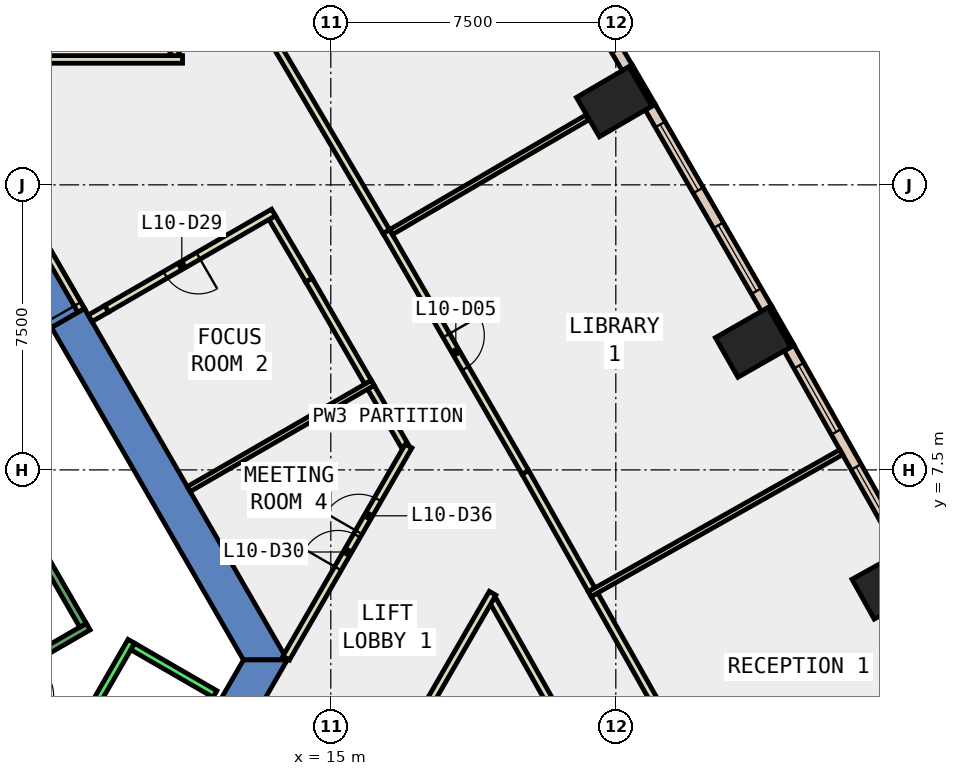
"""IFC4 building model, lengths in metres.
Left out: names, types, materials, properties, quantities, classifications, styles, units other than length and angle.
Written with IfcOpenShell. Run it as: python <this file> out.ifc"""

import sys

from ifc_helpers import new_model, si_unit, direction, frame, frame_2d, origin, origin_2d, place, context, subcontext, project, spatial, polyline, rectangle, outline, extrude, element, fill, save


model = new_model("IFC4")
c1 = context("Model", 3, precision=1e-05, world=origin(), true_north=direction((0.0, 1.0)))
c2 = subcontext(c1, "Body", "Model", "MODEL_VIEW")
j1 = project(units=[si_unit("LENGTHUNIT", "METRE"), si_unit("PLANEANGLEUNIT", "RADIAN")], contexts=[c1])
p1 = place(None, origin())
s1 = spatial("IfcSite", under=j1, at=p1, CompositionType="ELEMENT")
p2 = place(p1, origin())
s2 = spatial("IfcBuilding", under=s1, at=p2, CompositionType="ELEMENT")
p3 = place(p2, frame((0.0, 0.0, 51.8)))
s3 = spatial("IfcBuildingStorey", under=s2, at=p3, CompositionType="ELEMENT", Elevation=51.8)
for number, where, z_axis, x_axis in (
    (1, (29.706, 4.487, -0.4), (0.0, 0.0, 1.0), (-0.487, 0.873, 0.0)),
    (2, (26.112, 10.855, -0.4), (0.0, 0.0, 1.0), (-0.496, 0.869, 0.0)),
    (3, (22.457, 17.186, -0.4), (0.0, 0.0, 1.0), (-0.504, 0.864, 0.0)),
):
    element("IfcColumn", number, at=place(p3, frame(where, z_axis=z_axis, x_axis=x_axis)), inside=s3, PredefinedType="COLUMN", context=c2, shape_type="SweptSolid", body=[
        extrude(rectangle(XDim=1.2, YDim=1.6, at=origin_2d()), origin(), (0.0, 0.0, 1.0), 4.2),
    ])
p4 = place(p3, frame((0.0, 0.0, -0.4)))
e4 = element("IfcWall", 4, at=p4, inside=s3, PredefinedType="SHEAR", context=c2, shape_type="SweptSolid", body=[
    extrude(outline(polyline([(8.517, 11.748), (7.651, 11.248), (12.702, 2.5), (13.856, 2.5), (8.517, 11.748)])), origin(), (0.0, 0.0, 1.0), 4.2),
])
p5 = place(p3, frame((0.0, 0.0, 3.6)))
e5 = element("IfcWall", 5, at=p5, inside=s3, PredefinedType="SHEAR", context=c2, shape_type="SweptSolid", body=[
    extrude(outline(polyline([(7.517, 13.48), (6.651, 12.98), (7.651, 11.248), (8.517, 11.748), (7.517, 13.48)])), origin(), (0.0, 0.0, 1.0), 0.2),
])
p6 = place(p3, frame((0.0, 0.0, -0.4)))
e6 = element("IfcWall", 6, at=p6, inside=s3, PredefinedType="SHEAR", context=c2, shape_type="SweptSolid", body=[
    extrude(outline(polyline([(11.801, 0.94), (12.667, 0.44), (13.856, 2.5), (12.702, 2.5), (11.801, 0.94)])), origin(), (0.0, 0.0, 1.0), 4.2),
])
p7 = place(p3, frame((27.148, 10.755, 0.0), z_axis=(0.0, 0.0, 1.0), x_axis=(-0.495766453659, 0.86845588456, 0.0)))
e7 = element("IfcWall", 7, at=p7, inside=s3, PredefinedType="STANDARD", context=c2, shape_type="SweptSolid", body=[
    extrude(rectangle(XDim=1.2, YDim=0.1, at=frame_2d((0.6, 0.0))), origin(), (0.0, 0.0, 1.0), 3.8),
])
p8 = place(p3, frame((23.493, 17.097, 0.0), z_axis=(0.0, 0.0, 1.0), x_axis=(-0.504225229382, 0.863572184623, 0.0)))
e8 = element("IfcWall", 8, at=p8, inside=s3, PredefinedType="STANDARD", context=c2, shape_type="SweptSolid", body=[
    extrude(rectangle(XDim=1.2, YDim=0.1, at=frame_2d((0.6, 0.0))), origin(), (0.0, 0.0, 1.0), 3.8),
])
p9 = place(p3, frame((30.067, 5.374, 0.0), z_axis=(0.0, 0.0, 1.0), x_axis=(-0.49151046248, 0.870871669807, 0.0)))
e9 = element("IfcWall", 9, at=p9, inside=s3, PredefinedType="STANDARD", context=c2, shape_type="SweptSolid", body=[
    extrude(rectangle(XDim=6.122, YDim=0.3, at=frame_2d((3.061, 0.0))), origin(), (0.0, 0.0, 1.0), 3.8),
])
p10 = place(p9, frame((0.53, 0.0, 0.9)))
e10 = element("IfcOpeningElement", 10, at=p10, cuts=e9, PredefinedType="OPENING", context=c2, shape_type="SweptSolid", body=[
    extrude(rectangle(XDim=2.0, YDim=2.6, at=frame_2d((1.0, 1.3))), frame((0.0, 0.16, 0.0), z_axis=(0.0, -1.0, 0.0), x_axis=(1.0, 0.0, 0.0)), (0.0, 0.0, 1.0), 0.32),
])
p11 = place(p9, frame((3.591, 0.0, 0.9)))
e11 = element("IfcOpeningElement", 11, at=p11, cuts=e9, PredefinedType="OPENING", context=c2, shape_type="SweptSolid", body=[
    extrude(rectangle(XDim=2.0, YDim=2.6, at=frame_2d((1.0, 1.3))), frame((0.0, 0.16, 0.0), z_axis=(0.0, -1.0, 0.0), x_axis=(1.0, 0.0, 0.0)), (0.0, 0.0, 1.0), 0.32),
])
p12 = place(p3, frame((26.464, 11.745, 0.0), z_axis=(0.0, 0.0, 1.0), x_axis=(-0.499957248001, 0.866050085256, 0.0)))
e12 = element("IfcWall", 12, at=p12, inside=s3, PredefinedType="STANDARD", context=c2, shape_type="SweptSolid", body=[
    extrude(rectangle(XDim=6.121, YDim=0.3, at=frame_2d((3.06, 0.0))), origin(), (0.0, 0.0, 1.0), 3.8),
])
p13 = place(p12, frame((0.53, 0.0, 0.9)))
e13 = element("IfcOpeningElement", 13, at=p13, cuts=e12, PredefinedType="OPENING", context=c2, shape_type="SweptSolid", body=[
    extrude(rectangle(XDim=2.0, YDim=2.6, at=frame_2d((1.0, 1.3))), frame((0.0, 0.16, 0.0), z_axis=(0.0, -1.0, 0.0), x_axis=(1.0, 0.0, 0.0)), (0.0, 0.0, 1.0), 0.32),
])
p14 = place(p12, frame((3.591, 0.0, 0.9)))
e14 = element("IfcOpeningElement", 14, at=p14, cuts=e12, PredefinedType="OPENING", context=c2, shape_type="SweptSolid", body=[
    extrude(rectangle(XDim=2.0, YDim=2.6, at=frame_2d((1.0, 1.3))), frame((0.0, 0.16, 0.0), z_axis=(0.0, -1.0, 0.0), x_axis=(1.0, 0.0, 0.0)), (0.0, 0.0, 1.0), 0.32),
])
p15 = place(p3, frame((22.8, 18.08, 0.0), z_axis=(0.0, 0.0, 1.0), x_axis=(-0.508412153373, 0.861113861404, 0.0)))
e15 = element("IfcWall", 15, at=p15, inside=s3, PredefinedType="STANDARD", context=c2, shape_type="SweptSolid", body=[
    extrude(rectangle(XDim=6.121, YDim=0.3, at=frame_2d((3.061, 0.0))), origin(), (0.0, 0.0, 1.0), 3.8),
])
p16 = place(p15, frame((0.53, 0.0, 0.9)))
e16 = element("IfcOpeningElement", 16, at=p16, cuts=e15, PredefinedType="OPENING", context=c2, shape_type="SweptSolid", body=[
    extrude(rectangle(XDim=2.0, YDim=2.6, at=frame_2d((1.0, 1.3))), frame((0.0, 0.16, 0.0), z_axis=(0.0, -1.0, 0.0), x_axis=(1.0, 0.0, 0.0)), (0.0, 0.0, 1.0), 0.32),
])
p17 = place(p15, frame((3.591, 0.0, 0.9)))
e17 = element("IfcOpeningElement", 17, at=p17, cuts=e15, PredefinedType="OPENING", context=c2, shape_type="SweptSolid", body=[
    extrude(rectangle(XDim=2.0, YDim=2.6, at=frame_2d((1.0, 1.3))), frame((0.0, 0.16, 0.0), z_axis=(0.0, -1.0, 0.0), x_axis=(1.0, 0.0, 0.0)), (0.0, 0.0, 1.0), 0.32),
])
p18 = place(p3, frame((15.98, 9.805, 0.0), z_axis=(0.0, 0.0, 1.0), x_axis=(-0.500150684419, 0.865938388614, 0.0)))
e18 = element("IfcWall", 18, at=p18, inside=s3, PredefinedType="PARTITIONING", context=c2, shape_type="SweptSolid", body=[
    extrude(rectangle(XDim=3.109, YDim=0.2, at=frame_2d((1.554, 0.0))), origin(), (0.0, 0.0, 1.0), 3.8),
])
p19 = place(p3, frame((14.425, 12.497, 0.0), z_axis=(0.0, 0.0, 1.0), x_axis=(-0.508111788435, 0.861291129905, 0.0)))
e19 = element("IfcWall", 19, at=p19, inside=s3, PredefinedType="PARTITIONING", context=c2, shape_type="SweptSolid", body=[
    extrude(rectangle(XDim=1.905, YDim=0.2, at=frame_2d((0.953, 0.0))), origin(), (0.0, 0.0, 1.0), 3.8),
])
p20 = place(p3, frame((13.492, 14.274, 0.0), z_axis=(0.0, 0.0, 1.0), x_axis=(-0.866003598361, -0.5000377662, 0.0)))
e20 = element("IfcWall", 20, at=p20, inside=s3, PredefinedType="PARTITIONING", context=c2, shape_type="SweptSolid", body=[
    extrude(rectangle(XDim=5.071, YDim=0.2, at=frame_2d((2.536, 0.0))), origin(), (0.0, 0.0, 1.0), 3.8),
])
p21 = place(p20, frame((2.286, 0.0, 0.0)))
e21 = element("IfcOpeningElement", 21, at=p21, cuts=e20, PredefinedType="OPENING", context=c2, shape_type="SweptSolid", body=[
    extrude(rectangle(XDim=1.0, YDim=2.1, at=frame_2d((0.5, 1.05))), frame((0.0, 0.11, 0.0), z_axis=(0.0, -1.0, 0.0), x_axis=(1.0, 0.0, 0.0)), (0.0, 0.0, 1.0), 0.22),
])
p22 = place(p3, frame((16.948, 8.128, 0.0), z_axis=(0.0, 0.0, 1.0), x_axis=(-0.499931460552, 0.866064971437, 0.0)))
e22 = element("IfcWall", 22, at=p22, inside=s3, PredefinedType="PARTITIONING", context=c2, shape_type="SweptSolid", body=[
    extrude(rectangle(XDim=1.786, YDim=0.2, at=frame_2d((0.893, 0.0))), origin(), (0.0, 0.0, 1.0), 3.8),
])
p23 = place(p3, frame((10.948, 18.386, 0.0), z_axis=(0.0, 0.0, 1.0), x_axis=(-0.506880801681, 0.862016155815, 0.0)))
e23 = element("IfcWall", 23, at=p23, inside=s3, PredefinedType="PARTITIONING", context=c2, shape_type="SweptSolid", body=[
    extrude(rectangle(XDim=0.383, YDim=0.2, at=frame_2d((0.191, 0.0))), origin(), (0.0, 0.0, 1.0), 3.8),
])
p24 = place(p3, frame((21.585, -0.045, 0.0), z_axis=(0.0, 0.0, 1.0), x_axis=(-0.491542684896, 0.870853483042, 0.0)))
e24 = element("IfcWall", 24, at=p24, inside=s3, PredefinedType="PARTITIONING", context=c2, shape_type="SweptSolid", body=[
    extrude(rectangle(XDim=4.738, YDim=0.2, at=frame_2d((2.369, 0.0))), origin(), (0.0, 0.0, 1.0), 3.8),
])
p25 = place(p3, frame((21.937, 4.214, 0.0), z_axis=(0.0, 0.0, 1.0), x_axis=(0.491485799319, -0.870885588965, 0.0)))
e25 = element("IfcWall", 25, at=p25, inside=s3, PredefinedType="PARTITIONING", context=c2, shape_type="SweptSolid", body=[
    extrude(rectangle(XDim=3.548, YDim=0.2, at=frame_2d((1.774, 0.0))), origin(), (0.0, 0.0, 1.0), 3.8),
])
p26 = place(p3, frame((16.46, 13.772, 0.0), z_axis=(0.0, 0.0, 1.0), x_axis=(0.500099745063, -0.865967808286, 0.0)))
e26 = element("IfcWall", 26, at=p26, inside=s3, PredefinedType="PARTITIONING", context=c2, shape_type="SweptSolid", body=[
    extrude(rectangle(XDim=7.319, YDim=0.2, at=frame_2d((3.659, 0.0))), origin(), (0.0, 0.0, 1.0), 3.8),
])
p27 = place(p26, frame((3.159, 0.0, 0.0)))
e27 = element("IfcOpeningElement", 27, at=p27, cuts=e26, PredefinedType="OPENING", context=c2, shape_type="SweptSolid", body=[
    extrude(rectangle(XDim=1.0, YDim=2.1, at=frame_2d((0.5, 1.05))), frame((0.0, 0.11, 0.0), z_axis=(0.0, -1.0, 0.0), x_axis=(1.0, 0.0, 0.0)), (0.0, 0.0, 1.0), 0.22),
])
p28 = place(p3, frame((20.12, 7.434, 0.0), z_axis=(0.0, 0.0, 1.0), x_axis=(0.491394823876, -0.87093692485, 0.0)))
e28 = element("IfcWall", 28, at=p28, inside=s3, PredefinedType="PARTITIONING", context=c2, shape_type="SweptSolid", body=[
    extrude(rectangle(XDim=3.547, YDim=0.2, at=frame_2d((1.773, 0.0))), origin(), (0.0, 0.0, 1.0), 3.8),
])
p29 = place(p3, frame((12.815, 19.946, 0.0), z_axis=(0.0, 0.0, 1.0), x_axis=(0.508287536166, -0.861187424768, 0.0)))
e29 = element("IfcWall", 29, at=p29, inside=s3, PredefinedType="PARTITIONING", context=c2, shape_type="SweptSolid", body=[
    extrude(rectangle(XDim=7.169, YDim=0.2, at=frame_2d((3.584, 0.0))), origin(), (0.0, 0.0, 1.0), 3.8),
])
p30 = place(p3, frame((6.25, 1.894, 0.0), z_axis=(0.0, 0.0, 1.0), x_axis=(0.866043184279, -0.499969202016, 0.0)))
e30 = element("IfcWall", 30, at=p30, inside=s3, PredefinedType="PARTITIONING", context=c2, shape_type="SweptSolid", body=[
    extrude(rectangle(XDim=2.084, YDim=0.2, at=frame_2d((1.042, 0.0))), origin(), (0.0, 0.0, 1.0), 3.8),
])
p31 = place(p30, frame((0.642, 0.0, 0.0)))
e31 = element("IfcOpeningElement", 31, at=p31, cuts=e30, PredefinedType="OPENING", context=c2, shape_type="SweptSolid", body=[
    extrude(rectangle(XDim=0.9, YDim=2.1, at=frame_2d((0.45, 1.05))), frame((0.0, 0.11, 0.0), z_axis=(0.0, -1.0, 0.0), x_axis=(1.0, 0.0, 0.0)), (0.0, 0.0, 1.0), 0.22),
])
p32 = place(p3, frame((16.104, 9.79, 0.0), z_axis=(0.0, 0.0, 1.0), x_axis=(-0.866023462144, -0.500003363005, 0.0)))
e32 = element("IfcWall", 32, at=p32, inside=s3, PredefinedType="PARTITIONING", context=c2, shape_type="SweptSolid", body=[
    extrude(rectangle(XDim=5.592, YDim=0.15, at=frame_2d((2.796, 0.0))), origin(), (0.0, 0.0, 1.0), 3.8),
])
p33 = place(p3, frame((13.827, 2.55, 0.0), z_axis=(0.0, 0.0, 1.0), x_axis=(0.500093193185, 0.865971591988, 0.0)))
e33 = element("IfcWall", 33, at=p33, inside=s3, PredefinedType="PARTITIONING", context=c2, shape_type="SweptSolid", body=[
    extrude(rectangle(XDim=6.441, YDim=0.2, at=frame_2d((3.221, 0.0))), origin(), (0.0, 0.0, 1.0), 3.8),
])
p34 = place(p33, frame((2.721, 0.0, 0.0)))
e34 = element("IfcOpeningElement", 34, at=p34, cuts=e33, PredefinedType="OPENING", context=c2, shape_type="SweptSolid", body=[
    extrude(rectangle(XDim=1.0, YDim=2.1, at=frame_2d((0.5, 1.05))), frame((0.0, 0.11, 0.0), z_axis=(0.0, -1.0, 0.0), x_axis=(1.0, 0.0, 0.0)), (0.0, 0.0, 1.0), 0.22),
])
p35 = place(p33, frame((3.821, 0.0, 0.0)))
e35 = element("IfcOpeningElement", 35, at=p35, cuts=e33, PredefinedType="OPENING", context=c2, shape_type="SweptSolid", body=[
    extrude(rectangle(XDim=1.0, YDim=2.1, at=frame_2d((0.5, 1.05))), frame((0.0, 0.11, 0.0), z_axis=(0.0, -1.0, 0.0), x_axis=(1.0, 0.0, 0.0)), (0.0, 0.0, 1.0), 0.22),
])
p36 = place(p3, frame((0.4, 18.3, 0.0), z_axis=(0.0, 0.0, 1.0), x_axis=(1.0, 0.0, 0.0)))
e36 = element("IfcWall", 36, at=p36, inside=s3, PredefinedType="PARTITIONING", context=c2, shape_type="SweptSolid", body=[
    extrude(rectangle(XDim=10.699, YDim=0.2, at=frame_2d((5.35, 0.0))), origin(), (0.0, 0.0, 1.0), 3.8),
])
p37 = place(p3, frame((19.257, 4.255, 0.0), z_axis=(0.0, 0.0, 1.0), x_axis=(-0.499978317034, -0.866037922089, 0.0)))
e37 = element("IfcWall", 37, at=p37, inside=s3, PredefinedType="PARTITIONING", context=c2, shape_type="SweptSolid", body=[
    extrude(rectangle(XDim=12.913, YDim=0.2, at=frame_2d((6.456, 0.0))), origin(), (0.0, 0.0, 1.0), 3.8),
])
p38 = place(p3, frame((21.813, 4.231, 0.0), z_axis=(0.0, 0.0, 1.0), x_axis=(0.870901264369, 0.491458022337, 0.0)))
e38 = element("IfcWall", 38, at=p38, inside=s3, PredefinedType="PARTITIONING", context=c2, shape_type="SweptSolid", body=[
    extrude(rectangle(XDim=7.6, YDim=0.15, at=frame_2d((3.8, 0.0))), origin(), (0.0, 0.0, 1.0), 3.8),
])
p39 = place(p3, frame((16.584, 13.757, 0.0), z_axis=(0.0, 0.0, 1.0), x_axis=(0.863565634474, 0.504236447469, 0.0)))
e39 = element("IfcWall", 39, at=p39, inside=s3, PredefinedType="PARTITIONING", context=c2, shape_type="SweptSolid", body=[
    extrude(rectangle(XDim=5.981, YDim=0.15, at=frame_2d((2.99, 0.0))), origin(), (0.0, 0.0, 1.0), 3.8),
])
p40 = place(p3, frame((8.43, 11.698, 0.0), z_axis=(0.0, 0.0, 1.0), x_axis=(-0.50002537861, 0.866010750942, 0.0)))
e40 = element("IfcWall", 40, at=p40, inside=s3, PredefinedType="PARTITIONING", context=c2, shape_type="SweptSolid", body=[
    extrude(rectangle(XDim=2.0, YDim=0.2, at=frame_2d((1.0, 0.0))), origin(), (0.0, 0.0, 1.0), 2.4),
])
p41 = place(p40, frame((0.19, 0.0, 0.0)))
e41 = element("IfcOpeningElement", 41, at=p41, cuts=e40, PredefinedType="OPENING", context=c2, shape_type="SweptSolid", body=[
    extrude(rectangle(XDim=1.8, YDim=2.1, at=frame_2d((0.9, 1.05))), frame((0.0, 0.11, 0.0), z_axis=(0.0, -1.0, 0.0), x_axis=(1.0, 0.0, 0.0)), (0.0, 0.0, 1.0), 0.22),
])
p42 = place(p3, frame((9.1, 11.738, 0.0), z_axis=(0.0, 0.0, 1.0), x_axis=(-0.866071776036, -0.499919672301, 0.0)))
e42 = element("IfcWall", 42, at=p42, inside=s3, PredefinedType="PARTITIONING", context=c2, shape_type="SweptSolid", body=[
    extrude(rectangle(XDim=0.5, YDim=0.2, at=frame_2d((0.25, 0.0))), origin(), (0.0, 0.0, 1.0), 2.4),
])
p43 = place(p3, frame((4.451, -6.19, 0.0), z_axis=(0.0, 0.0, 1.0), x_axis=(0.50000090737, 0.866024879913, 0.0)))
e43 = element("IfcWall", 43, at=p43, inside=s3, PredefinedType="STANDARD", context=c2, shape_type="SweptSolid", body=[
    extrude(rectangle(XDim=10.6, YDim=0.2, at=frame_2d((5.3, 0.0))), origin(), (0.0, 0.0, 1.0), 3.8),
])
p44 = place(p3, frame((9.788, 2.853, 0.0), z_axis=(0.0, 0.0, 1.0), x_axis=(0.865998541277, -0.500046524342, 0.0)))
e44 = element("IfcWall", 44, at=p44, inside=s3, PredefinedType="STANDARD", context=c2, shape_type="SweptSolid", body=[
    extrude(rectangle(XDim=2.5, YDim=0.2, at=frame_2d((1.25, 0.0))), origin(), (0.0, 0.0, 1.0), 3.8),
])
p45 = place(p3, frame((4.806, 1.176, 0.0), z_axis=(0.0, 0.0, 1.0), x_axis=(0.866059941101, 0.499940174841, 0.0)))
e45 = element("IfcWall", 45, at=p45, inside=s3, PredefinedType="STANDARD", context=c2, shape_type="SweptSolid", body=[
    extrude(rectangle(XDim=4.4, YDim=0.2, at=frame_2d((2.2, 0.0))), origin(), (0.0, 0.0, 1.0), 3.8),
])
p46 = place(p45, frame((1.65, 0.0, 0.0)))
e46 = element("IfcOpeningElement", 46, at=p46, cuts=e45, PredefinedType="OPENING", context=c2, shape_type="SweptSolid", body=[
    extrude(rectangle(XDim=1.1, YDim=2.2, at=frame_2d((0.55, 1.1))), frame((0.0, 0.11, 0.0), z_axis=(0.0, -1.0, 0.0), x_axis=(1.0, 0.0, 0.0)), (0.0, 0.0, 1.0), 0.22),
])
p47 = place(p3, frame((8.48, 3.412, 0.0), z_axis=(0.0, 0.0, 1.0), x_axis=(-0.499978703459, 0.866037698999, 0.0)))
e47 = element("IfcWall", 47, at=p47, inside=s3, PredefinedType="STANDARD", context=c2, shape_type="SweptSolid", body=[
    extrude(rectangle(XDim=6.9, YDim=0.2, at=frame_2d((3.45, 0.0))), origin(), (0.0, 0.0, 1.0), 3.8),
])
p48 = place(p10, origin())
e48 = element("IfcWindow", 48, at=p48, inside=s3, PartitioningType="SINGLE_PANEL", PredefinedType="WINDOW", context=c2, shape_type="SweptSolid", body=[
    extrude(rectangle(XDim=2.0, YDim=2.6, at=frame_2d((1.0, 1.3))), frame((0.0, 0.03, 0.0), z_axis=(0.0, -1.0, 0.0), x_axis=(1.0, 0.0, 0.0)), (0.0, 0.0, 1.0), 0.06),
])
fill(e10, e48)
p49 = place(p11, origin())
e49 = element("IfcWindow", 49, at=p49, inside=s3, PartitioningType="SINGLE_PANEL", PredefinedType="WINDOW", context=c2, shape_type="SweptSolid", body=[
    extrude(rectangle(XDim=2.0, YDim=2.6, at=frame_2d((1.0, 1.3))), frame((0.0, 0.03, 0.0), z_axis=(0.0, -1.0, 0.0), x_axis=(1.0, 0.0, 0.0)), (0.0, 0.0, 1.0), 0.06),
])
fill(e11, e49)
p50 = place(p13, origin())
e50 = element("IfcWindow", 50, at=p50, inside=s3, PartitioningType="SINGLE_PANEL", PredefinedType="WINDOW", context=c2, shape_type="SweptSolid", body=[
    extrude(rectangle(XDim=2.0, YDim=2.6, at=frame_2d((1.0, 1.3))), frame((0.0, 0.03, 0.0), z_axis=(0.0, -1.0, 0.0), x_axis=(1.0, 0.0, 0.0)), (0.0, 0.0, 1.0), 0.06),
])
fill(e13, e50)
p51 = place(p14, origin())
e51 = element("IfcWindow", 51, at=p51, inside=s3, PartitioningType="SINGLE_PANEL", PredefinedType="WINDOW", context=c2, shape_type="SweptSolid", body=[
    extrude(rectangle(XDim=2.0, YDim=2.6, at=frame_2d((1.0, 1.3))), frame((0.0, 0.03, 0.0), z_axis=(0.0, -1.0, 0.0), x_axis=(1.0, 0.0, 0.0)), (0.0, 0.0, 1.0), 0.06),
])
fill(e14, e51)
p52 = place(p27, origin())
e52 = element("IfcDoor", 52, at=p52, inside=s3, OperationType="SINGLE_SWING_LEFT", PredefinedType="DOOR", context=c2, shape_type="SweptSolid", body=[
    extrude(rectangle(XDim=1.0, YDim=2.1, at=frame_2d((0.5, 1.05))), frame((0.0, 0.025, 0.0), z_axis=(0.0, -1.0, 0.0), x_axis=(1.0, 0.0, 0.0)), (0.0, 0.0, 1.0), 0.05),
])
fill(e27, e52)
p53 = place(p21, origin())
e53 = element("IfcDoor", 53, at=p53, inside=s3, OperationType="SINGLE_SWING_LEFT", PredefinedType="DOOR", context=c2, shape_type="SweptSolid", body=[
    extrude(rectangle(XDim=1.0, YDim=2.1, at=frame_2d((0.5, 1.05))), frame((0.0, 0.025, 0.0), z_axis=(0.0, -1.0, 0.0), x_axis=(1.0, 0.0, 0.0)), (0.0, 0.0, 1.0), 0.05),
])
fill(e21, e53)
p54 = place(p34, origin())
e54 = element("IfcDoor", 54, at=p54, inside=s3, OperationType="SINGLE_SWING_LEFT", PredefinedType="DOOR", context=c2, shape_type="SweptSolid", body=[
    extrude(rectangle(XDim=1.0, YDim=2.1, at=frame_2d((0.5, 1.05))), frame((0.0, 0.025, 0.0), z_axis=(0.0, -1.0, 0.0), x_axis=(1.0, 0.0, 0.0)), (0.0, 0.0, 1.0), 0.05),
])
fill(e34, e54)
p55 = place(p35, origin())
e55 = element("IfcDoor", 55, at=p55, inside=s3, OperationType="SINGLE_SWING_RIGHT", PredefinedType="DOOR", context=c2, shape_type="SweptSolid", body=[
    extrude(rectangle(XDim=1.0, YDim=2.1, at=frame_2d((0.5, 1.05))), frame((0.0, 0.025, 0.0), z_axis=(0.0, -1.0, 0.0), x_axis=(1.0, 0.0, 0.0)), (0.0, 0.0, 1.0), 0.05),
])
fill(e35, e55)
p56 = place(p41, origin())
e56 = element("IfcDoor", 56, at=p56, inside=s3, OperationType="DOUBLE_DOOR_SINGLE_SWING", PredefinedType="DOOR", context=c2, shape_type="SweptSolid", body=[
    extrude(rectangle(XDim=1.8, YDim=2.1, at=frame_2d((0.9, 1.05))), frame((0.0, 0.025, 0.0), z_axis=(0.0, -1.0, 0.0), x_axis=(1.0, 0.0, 0.0)), (0.0, 0.0, 1.0), 0.05),
])
fill(e41, e56)
save(model, sys.argv[1])
